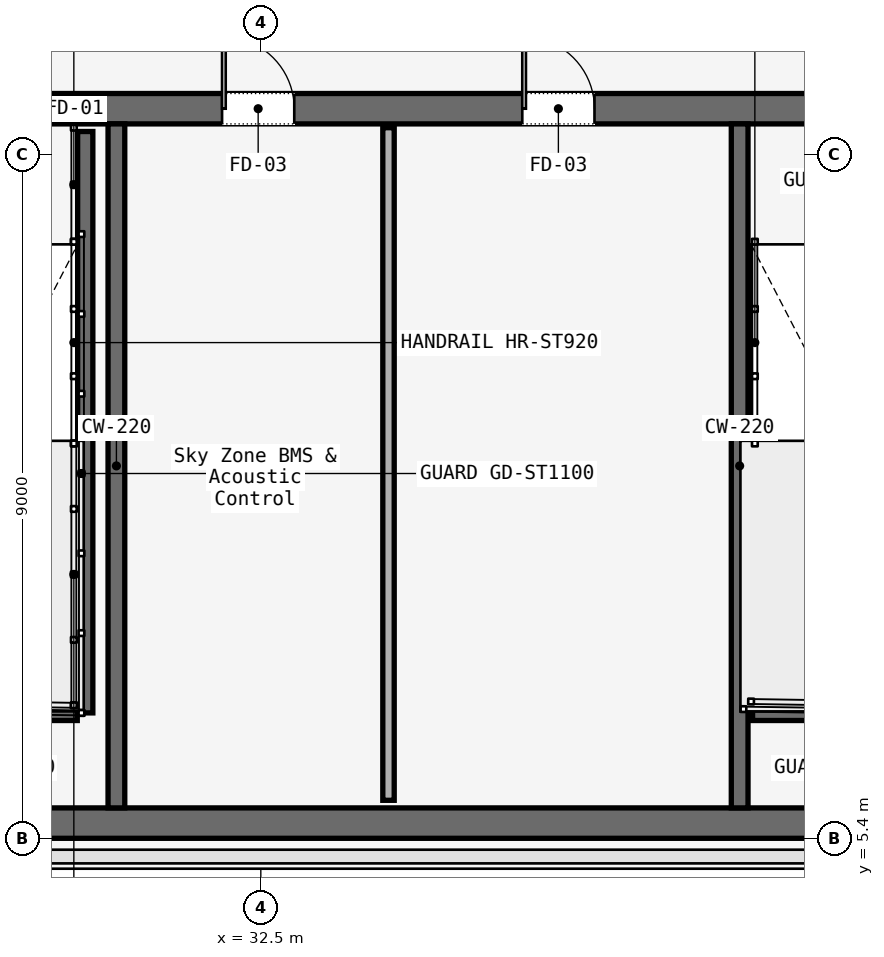
"""IFC4 building model, lengths in metres.
Left out: names, types, materials, properties, quantities, classifications, styles, units other than length and angle.
Written with IfcOpenShell. Run it as: python <this file> out.ifc"""

import sys

from ifc_helpers import new_model, si_unit, direction, frame, frame_2d, origin, place, context, subcontext, project, spatial, rectangle, extrude, element, fill, save


model = new_model("IFC4")
c1 = context("Model", 3, precision=1e-05, world=origin(), true_north=direction((0.0, 1.0)))
c2 = subcontext(c1, "Body", "Model", "MODEL_VIEW")
j1 = project(units=[si_unit("LENGTHUNIT", "METRE"), si_unit("PLANEANGLEUNIT", "RADIAN")], contexts=[c1])
p1 = place(None, origin())
s1 = spatial("IfcSite", under=j1, at=p1, CompositionType="ELEMENT")
p2 = place(p1, origin())
s2 = spatial("IfcBuilding", under=s1, at=p2, CompositionType="ELEMENT")
p3 = place(p2, frame((0.0, 0.0, 275.0)))
s3 = spatial("IfcBuildingStorey", under=s2, at=p3, CompositionType="ELEMENT", Elevation=275.0)
p4 = place(p3, frame((26.45, 15.0, 0.0), z_axis=(0.0, 0.0, 1.0), x_axis=(1.0, 0.0, 0.0)))
e1 = element("IfcWall", 1, at=p4, inside=s3, PredefinedType="SOLIDWALL", context=c2, shape_type="SweptSolid", body=[
    extrude(rectangle(XDim=31.1, YDim=0.4, at=frame_2d((15.55, 0.0))), origin(), (0.0, 0.0, 1.0), 3.52),
])
p5 = place(p4, frame((1.65, 0.0, 0.0)))
e2 = element("IfcOpeningElement", 2, at=p5, cuts=e1, PredefinedType="OPENING", context=c2, shape_type="SweptSolid", body=[
    extrude(rectangle(XDim=1.1, YDim=2.2, at=frame_2d((0.55, 1.1))), frame((0.0, 0.2, 0.0), z_axis=(0.0, -1.0, 0.0), x_axis=(1.0, 0.0, 0.0)), (0.0, 0.0, 1.0), 0.4),
])
p6 = place(p4, frame((13.65, 0.0, 0.0)))
e3 = element("IfcOpeningElement", 3, at=p6, cuts=e1, PredefinedType="OPENING", context=c2, shape_type="SweptSolid", body=[
    extrude(rectangle(XDim=1.1, YDim=2.2, at=frame_2d((0.55, 1.1))), frame((0.0, 0.2, 0.0), z_axis=(0.0, -1.0, 0.0), x_axis=(1.0, 0.0, 0.0)), (0.0, 0.0, 1.0), 0.4),
])
p7 = place(p4, frame((25.55, 0.0, 0.0)))
e4 = element("IfcOpeningElement", 4, at=p7, cuts=e1, PredefinedType="OPENING", context=c2, shape_type="SweptSolid", body=[
    extrude(rectangle(XDim=1.1, YDim=2.2, at=frame_2d((0.55, 1.1))), frame((0.0, 0.2, 0.0), z_axis=(0.0, -1.0, 0.0), x_axis=(1.0, 0.0, 0.0)), (0.0, 0.0, 1.0), 0.4),
])
p8 = place(p4, frame((19.35, 0.0, 0.0)))
e5 = element("IfcOpeningElement", 5, at=p8, cuts=e1, PredefinedType="OPENING", context=c2, shape_type="SweptSolid", body=[
    extrude(rectangle(XDim=1.1, YDim=2.2, at=frame_2d((0.55, 1.1))), frame((0.0, 0.2, 0.0), z_axis=(0.0, -1.0, 0.0), x_axis=(1.0, 0.0, 0.0)), (0.0, 0.0, 1.0), 0.4),
])
p9 = place(p4, frame((21.4, 0.0, 0.0)))
e6 = element("IfcOpeningElement", 6, at=p9, cuts=e1, PredefinedType="OPENING", context=c2, shape_type="SweptSolid", body=[
    extrude(rectangle(XDim=0.9, YDim=2.1, at=frame_2d((0.45, 1.05))), frame((0.0, 0.2, 0.0), z_axis=(0.0, -1.0, 0.0), x_axis=(1.0, 0.0, 0.0)), (0.0, 0.0, 1.0), 0.4),
])
p10 = place(p4, frame((5.54, 0.0, 0.0)))
e7 = element("IfcOpeningElement", 7, at=p10, cuts=e1, PredefinedType="OPENING", context=c2, shape_type="SweptSolid", body=[
    extrude(rectangle(XDim=0.95, YDim=2.2, at=frame_2d((0.475, 1.1))), frame((0.0, 0.2, 0.0), z_axis=(0.0, -1.0, 0.0), x_axis=(1.0, 0.0, 0.0)), (0.0, 0.0, 1.0), 0.4),
])
p11 = place(p4, frame((9.49, 0.0, 0.0)))
e8 = element("IfcOpeningElement", 8, at=p11, cuts=e1, PredefinedType="OPENING", context=c2, shape_type="SweptSolid", body=[
    extrude(rectangle(XDim=0.95, YDim=2.2, at=frame_2d((0.475, 1.1))), frame((0.0, 0.2, 0.0), z_axis=(0.0, -1.0, 0.0), x_axis=(1.0, 0.0, 0.0)), (0.0, 0.0, 1.0), 0.4),
])
p12 = place(p4, frame((23.35, 0.0, 0.0)))
e9 = element("IfcOpeningElement", 9, at=p12, cuts=e1, PredefinedType="OPENING", context=c2, shape_type="SweptSolid", body=[
    extrude(rectangle(XDim=1.3, YDim=2.3, at=frame_2d((0.65, 1.15))), frame((0.0, 0.2, 0.0), z_axis=(0.0, -1.0, 0.0), x_axis=(1.0, 0.0, 0.0)), (0.0, 0.0, 1.0), 0.4),
])
p13 = place(p3, frame((26.45, 5.6, 0.0), z_axis=(0.0, 0.0, 1.0), x_axis=(1.0, 0.0, 0.0)))
e10 = element("IfcWall", 10, at=p13, inside=s3, PredefinedType="SOLIDWALL", context=c2, shape_type="SweptSolid", body=[
    extrude(rectangle(XDim=31.1, YDim=0.4, at=frame_2d((15.55, 0.0))), origin(), (0.0, 0.0, 1.0), 3.52),
])
for number, where, z_axis, x_axis in (
    (11, (30.6, 5.8, 0.0), (0.0, 0.0, 1.0), (0.0, 1.0, 0.0)),
    (12, (38.8, 5.8, 0.0), (0.0, 0.0, 1.0), (0.0, 1.0, 0.0)),
):
    element("IfcWall", number, at=place(p3, frame(where, z_axis=z_axis, x_axis=x_axis)), inside=s3, PredefinedType="SOLIDWALL", context=c2, shape_type="SweptSolid", body=[
        extrude(rectangle(XDim=9.0, YDim=0.22, at=frame_2d((4.5, 0.0))), origin(), (0.0, 0.0, 1.0), 3.52),
    ])
p14 = place(p3, frame((30.19, 14.7, 0.0), z_axis=(0.0, 0.0, 1.0), x_axis=(0.0, -1.0, 0.0)))
e13 = element("IfcWall", 13, at=p14, inside=s3, PredefinedType="SOLIDWALL", context=c2, shape_type="SweptSolid", body=[
    extrude(rectangle(XDim=7.65, YDim=0.2, at=frame_2d((3.825, 0.0))), origin(), (0.0, 0.0, 1.0), 3.8),
])
for number, where, z_axis, x_axis in (
    (14, (26.97, 7.05, 0.0), (0.0, 0.0, 1.0), (1.0, 0.0, 0.0)),
    (15, (38.97, 7.05, 0.0), (0.0, 0.0, 1.0), (1.0, 0.0, 0.0)),
):
    element("IfcWall", number, at=place(p3, frame(where, z_axis=z_axis, x_axis=x_axis)), inside=s3, PredefinedType="SOLIDWALL", context=c2, shape_type="SweptSolid", body=[
        extrude(rectangle(XDim=3.115, YDim=0.2, at=frame_2d((1.558, 0.0))), origin(), (0.0, 0.0, 1.0), 3.8),
    ])
p15 = place(p3, frame((34.18, 5.9, 0.0), z_axis=(0.0, 0.0, 1.0), x_axis=(0.0, 1.0, 0.0)))
e16 = element("IfcWall", 16, at=p15, inside=s3, PredefinedType="PARTITIONING", context=c2, shape_type="SweptSolid", body=[
    extrude(rectangle(XDim=8.85, YDim=0.15, at=frame_2d((4.425, 0.0))), origin(), (0.0, 0.0, 1.0), 2.95),
])
p16 = place(p10, origin())
e17 = element("IfcDoor", 17, at=p16, inside=s3, OperationType="SINGLE_SWING_LEFT", PredefinedType="DOOR", context=c2, shape_type="SweptSolid", body=[
    extrude(rectangle(XDim=0.95, YDim=2.2, at=frame_2d((0.475, 1.1))), frame((0.0, 0.025, 0.0), z_axis=(0.0, -1.0, 0.0), x_axis=(1.0, 0.0, 0.0)), (0.0, 0.0, 1.0), 0.05),
])
fill(e7, e17)
p17 = place(p11, origin())
e18 = element("IfcDoor", 18, at=p17, inside=s3, OperationType="SINGLE_SWING_RIGHT", PredefinedType="DOOR", context=c2, shape_type="SweptSolid", body=[
    extrude(rectangle(XDim=0.95, YDim=2.2, at=frame_2d((0.475, 1.1))), frame((0.0, 0.025, 0.0), z_axis=(0.0, -1.0, 0.0), x_axis=(1.0, 0.0, 0.0)), (0.0, 0.0, 1.0), 0.05),
])
fill(e8, e18)
save(model, sys.argv[1])
